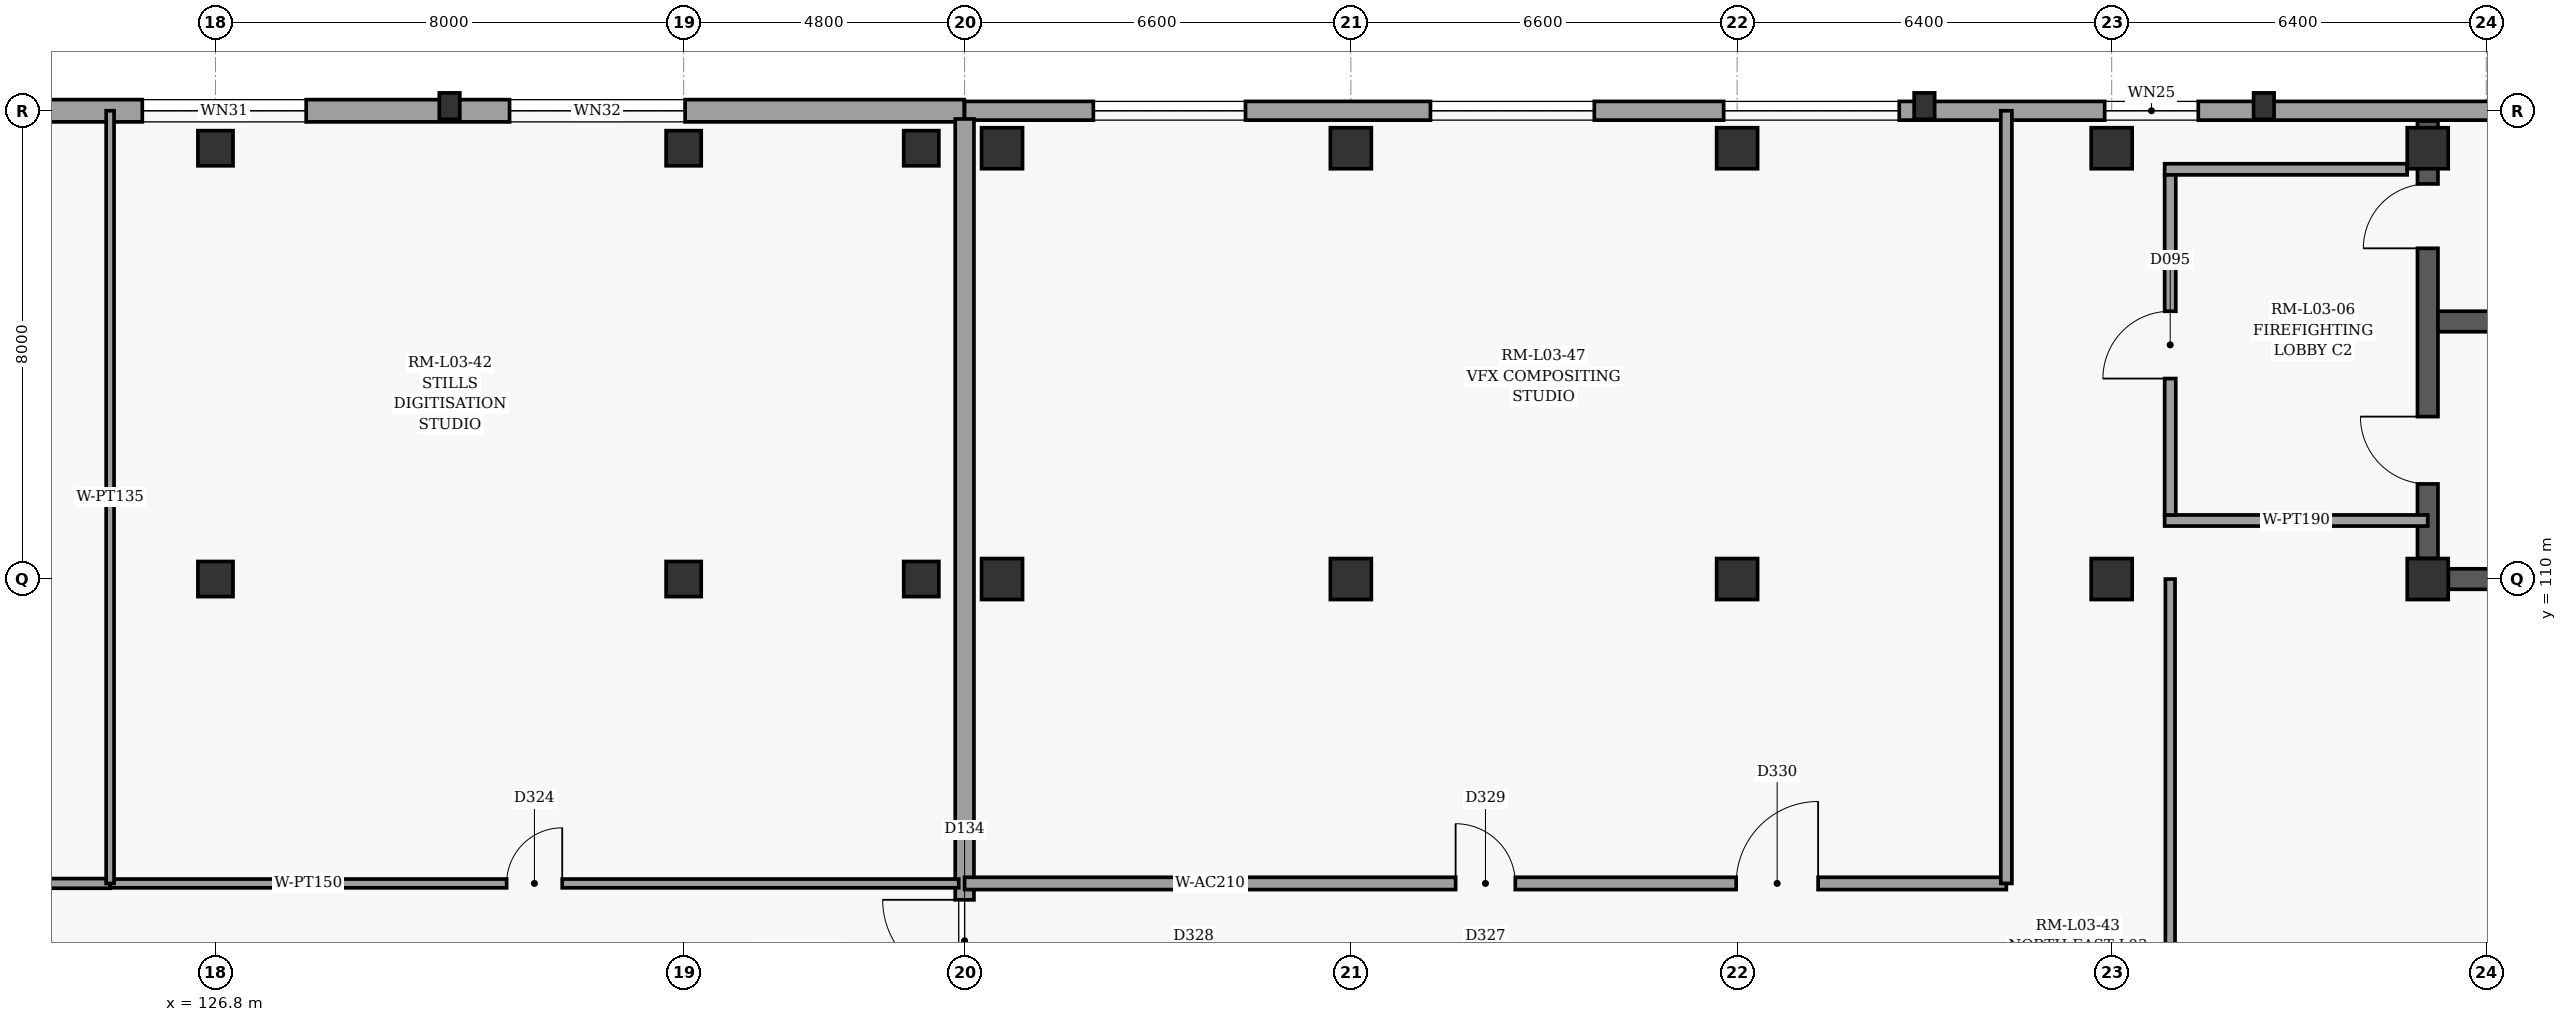
"""IFC4 building model, lengths in metres.
Left out: names, types, materials, properties, quantities, classifications, styles, units other than length and angle.
Written with IfcOpenShell. Run it as: python <this file> out.ifc"""

import sys

from ifc_helpers import new_model, si_unit, direction, frame, frame_2d, origin, origin_2d, place, context, subcontext, project, spatial, rectangle, extrude, element, fill, save


model = new_model("IFC4")
c1 = context("Model", 3, precision=1e-05, world=origin(), true_north=direction((0.0, 1.0)))
c2 = subcontext(c1, "Body", "Model", "MODEL_VIEW")
j1 = project(units=[si_unit("LENGTHUNIT", "METRE"), si_unit("PLANEANGLEUNIT", "RADIAN")], contexts=[c1])
p1 = place(None, origin())
s1 = spatial("IfcSite", under=j1, at=p1, CompositionType="ELEMENT")
p2 = place(p1, origin())
s2 = spatial("IfcBuilding", under=s1, at=p2, CompositionType="ELEMENT")
p3 = place(p2, frame((0.0, 0.0, 15.6)))
s3 = spatial("IfcBuildingStorey", under=s2, at=p3, CompositionType="ELEMENT", Elevation=15.6)
for number, where, z_axis, x_axis in (
    (1, (126.8, 110.0, 0.0), (0.0, 0.0, 1.0), (1.0, 0.0, 0.0)),
    (2, (126.8, 117.36, 0.0), (0.0, 0.0, 1.0), (1.0, 0.0, 0.0)),
    (3, (134.8, 110.0, 0.0), (0.0, 0.0, 1.0), (1.0, 0.0, 0.0)),
    (4, (134.8, 117.36, 0.0), (0.0, 0.0, 1.0), (1.0, 0.0, 0.0)),
    (5, (138.86, 110.0, 0.0), (0.0, 0.0, 1.0), (1.0, 0.0, 0.0)),
    (6, (138.86, 117.36, 0.0), (0.0, 0.0, 1.0), (1.0, 0.0, 0.0)),
):
    element("IfcColumn", number, at=place(p3, frame(where, z_axis=z_axis, x_axis=x_axis)), inside=s3, PredefinedType="COLUMN", context=c2, shape_type="SweptSolid", body=[
        extrude(rectangle(XDim=0.6, YDim=0.6, at=origin_2d()), origin(), (0.0, 0.0, 1.0), 4.8),
    ])
for number, where, z_axis, x_axis in (
    (7, (140.24, 110.0, 0.0), (0.0, 0.0, 1.0), (1.0, 0.0, 0.0)),
    (8, (140.24, 117.36, 0.0), (0.0, 0.0, 1.0), (1.0, 0.0, 0.0)),
    (9, (146.2, 110.0, 0.0), (0.0, 0.0, 1.0), (1.0, 0.0, 0.0)),
    (10, (146.2, 117.36, 0.0), (0.0, 0.0, 1.0), (1.0, 0.0, 0.0)),
    (11, (152.8, 110.0, 0.0), (0.0, 0.0, 1.0), (1.0, 0.0, 0.0)),
    (12, (152.8, 117.36, 0.0), (0.0, 0.0, 1.0), (1.0, 0.0, 0.0)),
    (13, (159.2, 110.0, 0.0), (0.0, 0.0, 1.0), (1.0, 0.0, 0.0)),
    (14, (159.2, 117.36, 0.0), (0.0, 0.0, 1.0), (1.0, 0.0, 0.0)),
    (15, (164.6, 110.0, 0.0), (0.0, 0.0, 1.0), (1.0, 0.0, 0.0)),
    (16, (164.6, 117.36, 0.0), (0.0, 0.0, 1.0), (1.0, 0.0, 0.0)),
):
    element("IfcColumn", number, at=place(p3, frame(where, z_axis=z_axis, x_axis=x_axis)), inside=s3, PredefinedType="COLUMN", context=c2, shape_type="SweptSolid", body=[
        extrude(rectangle(XDim=0.7, YDim=0.7, at=origin_2d()), origin(), (0.0, 0.0, 1.0), 4.8),
    ])
for number, where, z_axis, x_axis in (
    (17, (130.8, 118.08, 0.0), (0.0, 0.0, 1.0), (0.0, 1.0, 0.0)),
    (18, (156.0, 118.08, 0.0), (0.0, 0.0, 1.0), (0.0, 1.0, 0.0)),
    (19, (161.8, 118.08, 0.0), (0.0, 0.0, 1.0), (0.0, 1.0, 0.0)),
):
    element("IfcColumn", number, at=place(p3, frame(where, z_axis=z_axis, x_axis=x_axis)), inside=s3, PredefinedType="PILASTER", context=c2, shape_type="SweptSolid", body=[
        extrude(rectangle(XDim=0.35, YDim=0.45, at=origin_2d()), origin(), (0.0, 0.0, 1.0), 4.8),
    ])
p4 = place(p3, frame((110.8, 118.0, 0.0), z_axis=(0.0, 0.0, 1.0), x_axis=(1.0, 0.0, 0.0)))
e20 = element("IfcWall", 20, at=p4, inside=s3, PredefinedType="SOLIDWALL", context=c2, shape_type="SweptSolid", body=[
    extrude(rectangle(XDim=28.795, YDim=0.38, at=frame_2d((14.397, 0.0))), origin(), (0.0, 0.0, 1.0), 4.555),
])
p5 = place(p4, frame((0.75, 0.0, 0.9)))
e21 = element("IfcOpeningElement", 21, at=p5, cuts=e20, PredefinedType="OPENING", context=c2, shape_type="SweptSolid", body=[
    extrude(rectangle(XDim=2.4, YDim=1.75, at=frame_2d((1.2, 0.875))), frame((0.0, 0.2, 0.0), z_axis=(0.0, -1.0, 0.0), x_axis=(1.0, 0.0, 0.0)), (0.0, 0.0, 1.0), 0.4),
])
p6 = place(p4, frame((8.475, 0.0, 0.9)))
e22 = element("IfcOpeningElement", 22, at=p6, cuts=e20, PredefinedType="OPENING", context=c2, shape_type="SweptSolid", body=[
    extrude(rectangle(XDim=2.6, YDim=1.75, at=frame_2d((1.3, 0.875))), frame((0.0, 0.2, 0.0), z_axis=(0.0, -1.0, 0.0), x_axis=(1.0, 0.0, 0.0)), (0.0, 0.0, 1.0), 0.4),
])
p7 = place(p4, frame((14.75, 0.0, 0.9)))
e23 = element("IfcOpeningElement", 23, at=p7, cuts=e20, PredefinedType="OPENING", context=c2, shape_type="SweptSolid", body=[
    extrude(rectangle(XDim=2.8, YDim=1.8, at=frame_2d((1.4, 0.9))), frame((0.0, 0.2, 0.0), z_axis=(0.0, -1.0, 0.0), x_axis=(1.0, 0.0, 0.0)), (0.0, 0.0, 1.0), 0.4),
])
p8 = place(p4, frame((21.025, 0.0, 0.9)))
e24 = element("IfcOpeningElement", 24, at=p8, cuts=e20, PredefinedType="OPENING", context=c2, shape_type="SweptSolid", body=[
    extrude(rectangle(XDim=3.0, YDim=1.8, at=frame_2d((1.5, 0.9))), frame((0.0, 0.2, 0.0), z_axis=(0.0, -1.0, 0.0), x_axis=(1.0, 0.0, 0.0)), (0.0, 0.0, 1.0), 0.4),
])
p9 = place(p3, frame((139.6, 118.0, 0.0), z_axis=(0.0, 0.0, 1.0), x_axis=(1.0, 0.0, 0.0)))
e25 = element("IfcWall", 25, at=p9, inside=s3, PredefinedType="SOLIDWALL", context=c2, shape_type="SweptSolid", body=[
    extrude(rectangle(XDim=32.4, YDim=0.32, at=frame_2d((16.2, 0.0))), origin(), (0.0, 0.0, 1.0), 4.58),
])
p10 = place(p9, frame((2.2, 0.0, 0.9)))
e26 = element("IfcOpeningElement", 26, at=p10, cuts=e25, PredefinedType="OPENING", context=c2, shape_type="SweptSolid", body=[
    extrude(rectangle(XDim=2.6, YDim=1.75, at=frame_2d((1.3, 0.875))), frame((0.0, 0.17, 0.0), z_axis=(0.0, -1.0, 0.0), x_axis=(1.0, 0.0, 0.0)), (0.0, 0.0, 1.0), 0.34),
])
p11 = place(p9, frame((7.96, 0.0, 0.9)))
e27 = element("IfcOpeningElement", 27, at=p11, cuts=e25, PredefinedType="OPENING", context=c2, shape_type="SweptSolid", body=[
    extrude(rectangle(XDim=2.8, YDim=1.8, at=frame_2d((1.4, 0.9))), frame((0.0, 0.17, 0.0), z_axis=(0.0, -1.0, 0.0), x_axis=(1.0, 0.0, 0.0)), (0.0, 0.0, 1.0), 0.34),
])
p12 = place(p9, frame((12.97, 0.0, 0.9)))
e28 = element("IfcOpeningElement", 28, at=p12, cuts=e25, PredefinedType="OPENING", context=c2, shape_type="SweptSolid", body=[
    extrude(rectangle(XDim=3.0, YDim=1.8, at=frame_2d((1.5, 0.9))), frame((0.0, 0.17, 0.0), z_axis=(0.0, -1.0, 0.0), x_axis=(1.0, 0.0, 0.0)), (0.0, 0.0, 1.0), 0.34),
])
p13 = place(p9, frame((19.48, 0.0, 0.9)))
e29 = element("IfcOpeningElement", 29, at=p13, cuts=e25, PredefinedType="OPENING", context=c2, shape_type="SweptSolid", body=[
    extrude(rectangle(XDim=1.6, YDim=1.65, at=frame_2d((0.8, 0.825))), frame((0.0, 0.17, 0.0), z_axis=(0.0, -1.0, 0.0), x_axis=(1.0, 0.0, 0.0)), (0.0, 0.0, 1.0), 0.34),
])
p14 = place(p3, frame((139.6, 71.74, 0.0), z_axis=(0.0, 0.0, 1.0), x_axis=(0.0, 1.0, 0.0)))
e30 = element("IfcWall", 30, at=p14, inside=s3, PredefinedType="SOLIDWALL", context=c2, shape_type="SweptSolid", body=[
    extrude(rectangle(XDim=46.12, YDim=0.32, at=frame_2d((23.06, 0.0))), origin(), (0.0, 0.0, 1.0), 4.58),
])
p15 = place(p14, frame((31.38, 0.0, 0.0)))
e31 = element("IfcOpeningElement", 31, at=p15, cuts=e30, PredefinedType="OPENING", context=c2, shape_type="SweptSolid", body=[
    extrude(rectangle(XDim=1.4, YDim=2.25, at=frame_2d((0.7, 1.125))), frame((0.0, 0.17, 0.0), z_axis=(0.0, -1.0, 0.0), x_axis=(1.0, 0.0, 0.0)), (0.0, 0.0, 1.0), 0.34),
])
p16 = place(p3, frame((164.952, 110.0, 0.0), z_axis=(0.0, 0.0, 1.0), x_axis=(1.0, 0.0, 0.0)))
e32 = element("IfcWall", 32, at=p16, inside=s3, PredefinedType="SHEAR", context=c2, shape_type="SweptSolid", body=[
    extrude(rectangle(XDim=7.223, YDim=0.35, at=frame_2d((3.612, 0.0))), origin(), (0.0, 0.0, 1.0), 4.58),
])
p17 = place(p3, frame((164.6, 110.352, 0.0), z_axis=(0.0, 0.0, 1.0), x_axis=(0.0, 1.0, 0.0)))
e33 = element("IfcWall", 33, at=p17, inside=s3, PredefinedType="SHEAR", context=c2, shape_type="SweptSolid", body=[
    extrude(rectangle(XDim=7.473, YDim=0.35, at=frame_2d((3.736, 0.0))), origin(), (0.0, 0.0, 1.0), 4.58),
])
p18 = place(p17, frame((5.298, 0.0, 0.0)))
e34 = element("IfcOpeningElement", 34, at=p18, cuts=e33, PredefinedType="OPENING", context=c2, shape_type="SweptSolid", body=[
    extrude(rectangle(XDim=1.1, YDim=2.15, at=frame_2d((0.55, 1.075))), frame((0.0, 0.185, 0.0), z_axis=(0.0, -1.0, 0.0), x_axis=(1.0, 0.0, 0.0)), (0.0, 0.0, 1.0), 0.37),
])
p19 = place(p17, frame((1.273, 0.0, 0.0)))
e35 = element("IfcOpeningElement", 35, at=p19, cuts=e33, PredefinedType="OPENING", context=c2, shape_type="SweptSolid", body=[
    extrude(rectangle(XDim=1.15, YDim=2.2, at=frame_2d((0.575, 1.1))), frame((0.0, 0.185, 0.0), z_axis=(0.0, -1.0, 0.0), x_axis=(1.0, 0.0, 0.0)), (0.0, 0.0, 1.0), 0.37),
])
p20 = place(p3, frame((164.775, 114.4, 0.0), z_axis=(0.0, 0.0, 1.0), x_axis=(1.0, 0.0, 0.0)))
e36 = element("IfcWall", 36, at=p20, inside=s3, PredefinedType="SHEAR", context=c2, shape_type="SweptSolid", body=[
    extrude(rectangle(XDim=7.05, YDim=0.35, at=frame_2d((3.525, 0.0))), origin(), (0.0, 0.0, 1.0), 4.58),
])
p21 = place(p3, frame((160.105, 111.0, 0.0), z_axis=(0.0, 0.0, 1.0), x_axis=(1.0, 0.0, 0.0)))
e37 = element("IfcWall", 37, at=p21, inside=s3, PredefinedType="PARTITIONING", context=c2, shape_type="SweptSolid", body=[
    extrude(rectangle(XDim=4.495, YDim=0.19, at=frame_2d((2.248, 0.0))), origin(), (0.0, 0.0, 1.0), 4.58),
])
p22 = place(p3, frame((160.105, 117.0, 0.0), z_axis=(0.0, 0.0, 1.0), x_axis=(1.0, 0.0, 0.0)))
e38 = element("IfcWall", 38, at=p22, inside=s3, PredefinedType="PARTITIONING", context=c2, shape_type="SweptSolid", body=[
    extrude(rectangle(XDim=4.143, YDim=0.19, at=frame_2d((2.072, 0.0))), origin(), (0.0, 0.0, 1.0), 3.93),
])
p23 = place(p3, frame((160.2, 111.095, 0.0), z_axis=(0.0, 0.0, 1.0), x_axis=(0.0, 1.0, 0.0)))
e39 = element("IfcWall", 39, at=p23, inside=s3, PredefinedType="PARTITIONING", context=c2, shape_type="SweptSolid", body=[
    extrude(rectangle(XDim=5.81, YDim=0.19, at=frame_2d((2.905, 0.0))), origin(), (0.0, 0.0, 1.0), 4.58),
])
p24 = place(p23, frame((2.33, 0.0, 0.0)))
e40 = element("IfcOpeningElement", 40, at=p24, cuts=e39, PredefinedType="OPENING", context=c2, shape_type="SweptSolid", body=[
    extrude(rectangle(XDim=1.15, YDim=2.2, at=frame_2d((0.575, 1.1))), frame((0.0, 0.105, 0.0), z_axis=(0.0, -1.0, 0.0), x_axis=(1.0, 0.0, 0.0)), (0.0, 0.0, 1.0), 0.21),
])
p25 = place(p3, frame((110.8, 104.8, 0.0), z_axis=(0.0, 0.0, 1.0), x_axis=(1.0, 0.0, 0.0)))
e41 = element("IfcWall", 41, at=p25, inside=s3, PredefinedType="PARTITIONING", context=c2, shape_type="SweptSolid", body=[
    extrude(rectangle(XDim=14.2, YDim=0.165, at=frame_2d((7.1, 0.0))), origin(), (0.0, 0.0, 1.0), 4.555),
])
p26 = place(p25, frame((6.64, 0.0, 0.0)))
e42 = element("IfcOpeningElement", 42, at=p26, cuts=e41, PredefinedType="OPENING", context=c2, shape_type="SweptSolid", body=[
    extrude(rectangle(XDim=0.92, YDim=2.1, at=frame_2d((0.46, 1.05))), frame((0.0, 0.093, 0.0), z_axis=(0.0, -1.0, 0.0), x_axis=(1.0, 0.0, 0.0)), (0.0, 0.0, 1.0), 0.185),
])
p27 = place(p3, frame((125.0, 104.8, 0.0), z_axis=(0.0, 0.0, 1.0), x_axis=(1.0, 0.0, 0.0)))
e43 = element("IfcWall", 43, at=p27, inside=s3, PredefinedType="PARTITIONING", context=c2, shape_type="SweptSolid", body=[
    extrude(rectangle(XDim=14.5, YDim=0.15, at=frame_2d((7.25, 0.0))), origin(), (0.0, 0.0, 1.0), 4.555),
])
p28 = place(p27, frame((6.775, 0.0, 0.0)))
e44 = element("IfcOpeningElement", 44, at=p28, cuts=e43, PredefinedType="OPENING", context=c2, shape_type="SweptSolid", body=[
    extrude(rectangle(XDim=0.95, YDim=2.1, at=frame_2d((0.475, 1.05))), frame((0.0, 0.085, 0.0), z_axis=(0.0, -1.0, 0.0), x_axis=(1.0, 0.0, 0.0)), (0.0, 0.0, 1.0), 0.17),
])
p29 = place(p3, frame((125.0, 118.0, 0.0), z_axis=(0.0, 0.0, 1.0), x_axis=(0.0, -1.0, 0.0)))
e45 = element("IfcWall", 45, at=p29, inside=s3, PredefinedType="PARTITIONING", context=c2, shape_type="SweptSolid", body=[
    extrude(rectangle(XDim=13.2, YDim=0.135, at=frame_2d((6.6, 0.0))), origin(), (0.0, 0.0, 1.0), 4.555),
])
p30 = place(p3, frame((139.6, 104.8, 0.0), z_axis=(0.0, 0.0, 1.0), x_axis=(1.0, 0.0, 0.0)))
e46 = element("IfcWall", 46, at=p30, inside=s3, PredefinedType="PARTITIONING", context=c2, shape_type="SweptSolid", body=[
    extrude(rectangle(XDim=17.8, YDim=0.21, at=frame_2d((8.9, 0.0))), origin(), (0.0, 0.0, 1.0), 4.58),
])
p31 = place(p30, frame((8.39, 0.0, 0.0)))
e47 = element("IfcOpeningElement", 47, at=p31, cuts=e46, PredefinedType="OPENING", context=c2, shape_type="SweptSolid", body=[
    extrude(rectangle(XDim=1.02, YDim=2.1, at=frame_2d((0.51, 1.05))), frame((0.0, 0.115, 0.0), z_axis=(0.0, -1.0, 0.0), x_axis=(1.0, 0.0, 0.0)), (0.0, 0.0, 1.0), 0.23),
])
p32 = place(p30, frame((13.184, 0.0, 0.0)))
e48 = element("IfcOpeningElement", 48, at=p32, cuts=e46, PredefinedType="OPENING", context=c2, shape_type="SweptSolid", body=[
    extrude(rectangle(XDim=1.4, YDim=2.25, at=frame_2d((0.7, 1.125))), frame((0.0, 0.115, 0.0), z_axis=(0.0, -1.0, 0.0), x_axis=(1.0, 0.0, 0.0)), (0.0, 0.0, 1.0), 0.23),
])
p33 = place(p3, frame((157.4, 104.8, 0.0), z_axis=(0.0, 0.0, 1.0), x_axis=(0.0, 1.0, 0.0)))
e49 = element("IfcWall", 49, at=p33, inside=s3, PredefinedType="PARTITIONING", context=c2, shape_type="SweptSolid", body=[
    extrude(rectangle(XDim=13.2, YDim=0.19, at=frame_2d((6.6, 0.0))), origin(), (0.0, 0.0, 1.0), 4.58),
])
p34 = place(p3, frame((160.2, 110.0, 0.0), z_axis=(0.0, 0.0, 1.0), x_axis=(0.0, -1.0, 0.0)))
e50 = element("IfcWall", 50, at=p34, inside=s3, PredefinedType="PARTITIONING", context=c2, shape_type="SweptSolid", body=[
    extrude(rectangle(XDim=8.0, YDim=0.165, at=frame_2d((4.0, 0.0))), origin(), (0.0, 0.0, 1.0), 4.58),
])
p35 = place(p7, origin())
e51 = element("IfcWindow", 51, at=p35, inside=s3, PartitioningType="SINGLE_PANEL", PredefinedType="WINDOW", context=c2, shape_type="SweptSolid", body=[
    extrude(rectangle(XDim=2.8, YDim=1.8, at=frame_2d((1.4, 0.9))), frame((0.0, 0.03, 0.0), z_axis=(0.0, -1.0, 0.0), x_axis=(1.0, 0.0, 0.0)), (0.0, 0.0, 1.0), 0.06),
])
fill(e23, e51)
p36 = place(p8, origin())
e52 = element("IfcWindow", 52, at=p36, inside=s3, PartitioningType="SINGLE_PANEL", PredefinedType="WINDOW", context=c2, shape_type="SweptSolid", body=[
    extrude(rectangle(XDim=3.0, YDim=1.8, at=frame_2d((1.5, 0.9))), frame((0.0, 0.03, 0.0), z_axis=(0.0, -1.0, 0.0), x_axis=(1.0, 0.0, 0.0)), (0.0, 0.0, 1.0), 0.06),
])
fill(e24, e52)
p37 = place(p10, origin())
e53 = element("IfcWindow", 53, at=p37, inside=s3, PartitioningType="SINGLE_PANEL", PredefinedType="WINDOW", context=c2, shape_type="SweptSolid", body=[
    extrude(rectangle(XDim=2.6, YDim=1.75, at=frame_2d((1.3, 0.875))), frame((0.0, 0.03, 0.0), z_axis=(0.0, -1.0, 0.0), x_axis=(1.0, 0.0, 0.0)), (0.0, 0.0, 1.0), 0.06),
])
fill(e26, e53)
p38 = place(p11, origin())
e54 = element("IfcWindow", 54, at=p38, inside=s3, PartitioningType="SINGLE_PANEL", PredefinedType="WINDOW", context=c2, shape_type="SweptSolid", body=[
    extrude(rectangle(XDim=2.8, YDim=1.8, at=frame_2d((1.4, 0.9))), frame((0.0, 0.03, 0.0), z_axis=(0.0, -1.0, 0.0), x_axis=(1.0, 0.0, 0.0)), (0.0, 0.0, 1.0), 0.06),
])
fill(e27, e54)
p39 = place(p12, origin())
e55 = element("IfcWindow", 55, at=p39, inside=s3, PartitioningType="SINGLE_PANEL", PredefinedType="WINDOW", context=c2, shape_type="SweptSolid", body=[
    extrude(rectangle(XDim=3.0, YDim=1.8, at=frame_2d((1.5, 0.9))), frame((0.0, 0.03, 0.0), z_axis=(0.0, -1.0, 0.0), x_axis=(1.0, 0.0, 0.0)), (0.0, 0.0, 1.0), 0.06),
])
fill(e28, e55)
p40 = place(p13, origin())
e56 = element("IfcWindow", 56, at=p40, inside=s3, PartitioningType="SINGLE_PANEL", PredefinedType="WINDOW", context=c2, shape_type="SweptSolid", body=[
    extrude(rectangle(XDim=1.6, YDim=1.65, at=frame_2d((0.8, 0.825))), frame((0.0, 0.03, 0.0), z_axis=(0.0, -1.0, 0.0), x_axis=(1.0, 0.0, 0.0)), (0.0, 0.0, 1.0), 0.06),
])
fill(e29, e56)
p41 = place(p18, origin())
e57 = element("IfcDoor", 57, at=p41, inside=s3, OperationType="SINGLE_SWING_LEFT", PredefinedType="DOOR", context=c2, shape_type="SweptSolid", body=[
    extrude(rectangle(XDim=1.1, YDim=2.15, at=frame_2d((0.55, 1.075))), frame((0.0, 0.025, 0.0), z_axis=(0.0, -1.0, 0.0), x_axis=(1.0, 0.0, 0.0)), (0.0, 0.0, 1.0), 0.05),
])
fill(e34, e57)
p42 = place(p19, origin())
e58 = element("IfcDoor", 58, at=p42, inside=s3, OperationType="SINGLE_SWING_RIGHT", PredefinedType="DOOR", context=c2, shape_type="SweptSolid", body=[
    extrude(rectangle(XDim=1.15, YDim=2.2, at=frame_2d((0.575, 1.1))), frame((0.0, 0.025, 0.0), z_axis=(0.0, -1.0, 0.0), x_axis=(1.0, 0.0, 0.0)), (0.0, 0.0, 1.0), 0.05),
])
fill(e35, e58)
p43 = place(p24, origin())
e59 = element("IfcDoor", 59, at=p43, inside=s3, OperationType="SINGLE_SWING_LEFT", PredefinedType="DOOR", context=c2, shape_type="SweptSolid", body=[
    extrude(rectangle(XDim=1.15, YDim=2.2, at=frame_2d((0.575, 1.1))), frame((0.0, 0.025, 0.0), z_axis=(0.0, -1.0, 0.0), x_axis=(1.0, 0.0, 0.0)), (0.0, 0.0, 1.0), 0.05),
])
fill(e40, e59)
p44 = place(p15, origin())
e60 = element("IfcDoor", 60, at=p44, inside=s3, OperationType="SINGLE_SWING_RIGHT", PredefinedType="DOOR", context=c2, shape_type="SweptSolid", body=[
    extrude(rectangle(XDim=1.4, YDim=2.25, at=frame_2d((0.7, 1.125))), frame((0.0, 0.025, 0.0), z_axis=(0.0, -1.0, 0.0), x_axis=(1.0, 0.0, 0.0)), (0.0, 0.0, 1.0), 0.05),
])
fill(e31, e60)
p45 = place(p28, origin())
e61 = element("IfcDoor", 61, at=p45, inside=s3, OperationType="SINGLE_SWING_RIGHT", PredefinedType="DOOR", context=c2, shape_type="SweptSolid", body=[
    extrude(rectangle(XDim=0.95, YDim=2.1, at=frame_2d((0.475, 1.05))), frame((0.0, 0.025, 0.0), z_axis=(0.0, -1.0, 0.0), x_axis=(1.0, 0.0, 0.0)), (0.0, 0.0, 1.0), 0.05),
])
fill(e44, e61)
p46 = place(p31, origin())
e62 = element("IfcDoor", 62, at=p46, inside=s3, OperationType="SINGLE_SWING_LEFT", PredefinedType="DOOR", context=c2, shape_type="SweptSolid", body=[
    extrude(rectangle(XDim=1.02, YDim=2.1, at=frame_2d((0.51, 1.05))), frame((0.0, 0.025, 0.0), z_axis=(0.0, -1.0, 0.0), x_axis=(1.0, 0.0, 0.0)), (0.0, 0.0, 1.0), 0.05),
])
fill(e47, e62)
p47 = place(p32, origin())
e63 = element("IfcDoor", 63, at=p47, inside=s3, OperationType="SINGLE_SWING_RIGHT", PredefinedType="DOOR", context=c2, shape_type="SweptSolid", body=[
    extrude(rectangle(XDim=1.4, YDim=2.25, at=frame_2d((0.7, 1.125))), frame((0.0, 0.025, 0.0), z_axis=(0.0, -1.0, 0.0), x_axis=(1.0, 0.0, 0.0)), (0.0, 0.0, 1.0), 0.05),
])
fill(e48, e63)
save(model, sys.argv[1])
